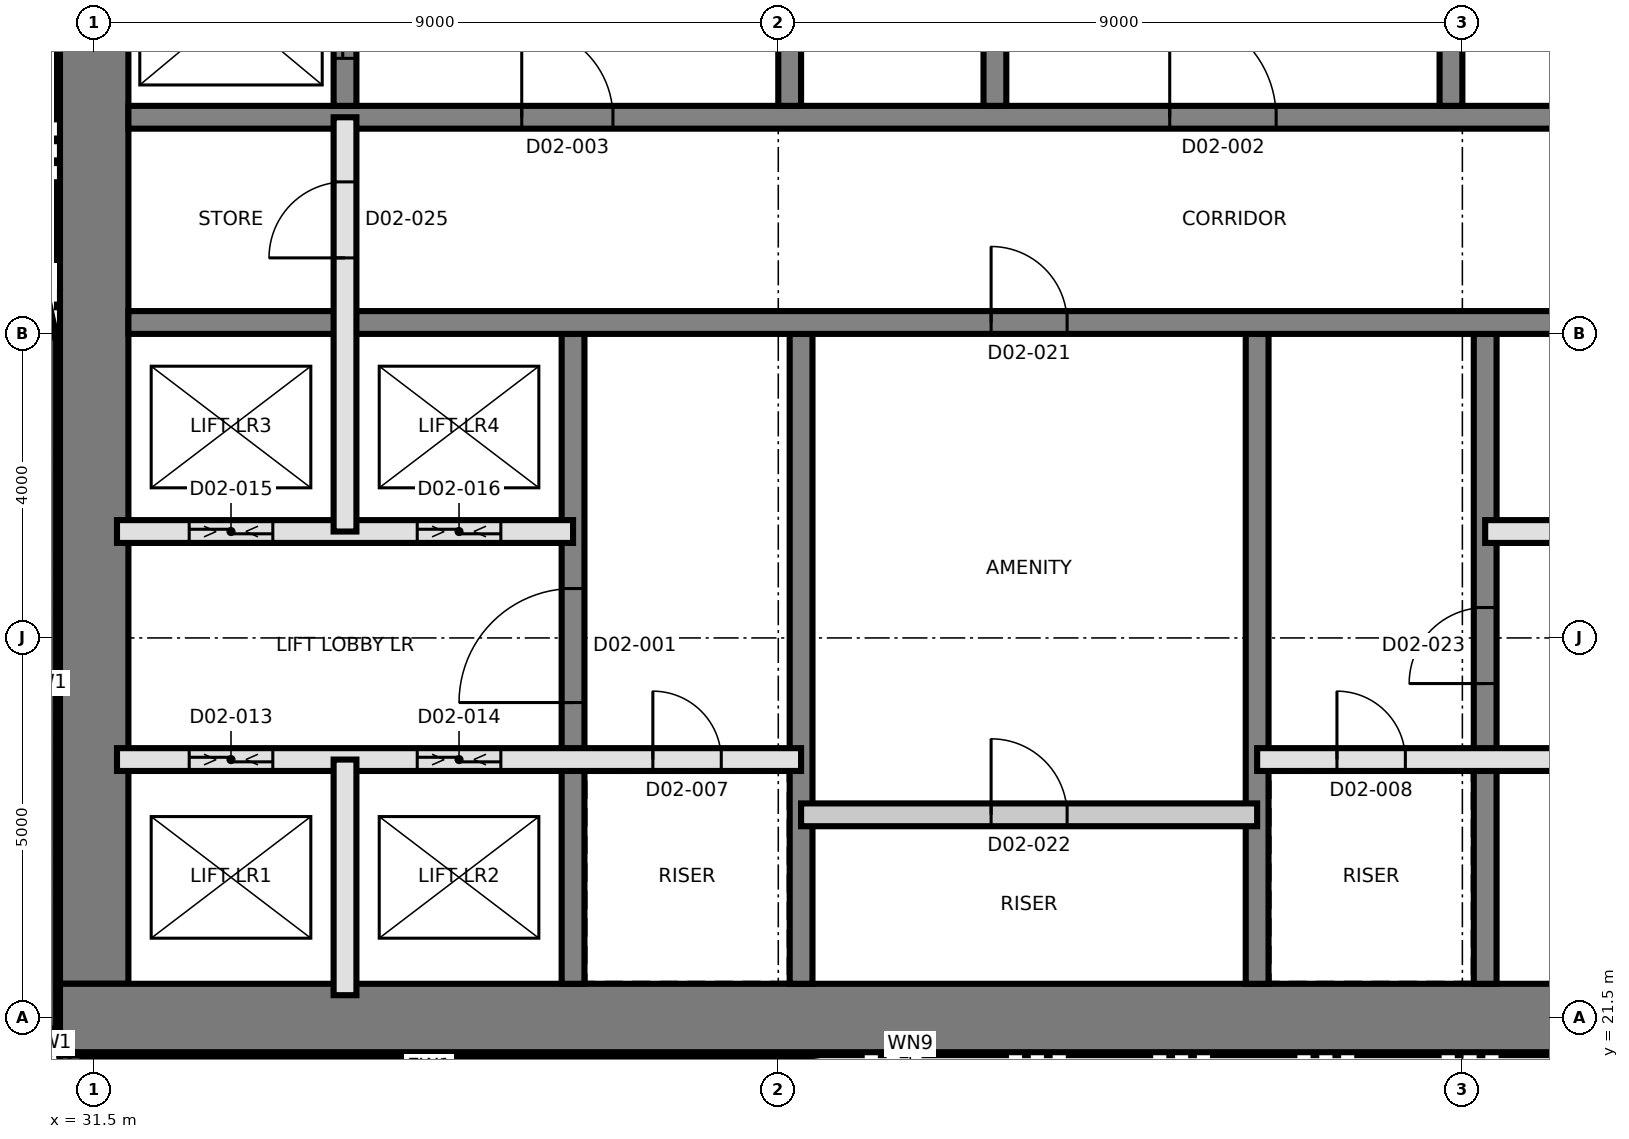
"""IFC4 building model, lengths in metres.
Left out: names, types, materials, properties, quantities, classifications, styles, units other than length and angle.
Written with IfcOpenShell. Run it as: python <this file> out.ifc"""

import sys

from ifc_helpers import new_model, si_unit, direction, frame, frame_2d, origin, place, context, subcontext, project, spatial, rectangle, extrude, element, fill, save


model = new_model("IFC4")
c1 = context("Model", 3, precision=1e-05, world=origin(), true_north=direction((0.0, 1.0)))
c2 = subcontext(c1, "Body", "Model", "MODEL_VIEW")
j1 = project(units=[si_unit("LENGTHUNIT", "METRE"), si_unit("PLANEANGLEUNIT", "RADIAN")], contexts=[c1])
p1 = place(None, origin())
s1 = spatial("IfcSite", under=j1, at=p1, CompositionType="ELEMENT")
p2 = place(p1, origin())
s2 = spatial("IfcBuilding", under=s1, at=p2, CompositionType="ELEMENT")
p3 = place(p2, frame((0.0, 0.0, 44.6)))
s3 = spatial("IfcBuildingStorey", under=s2, at=p3, CompositionType="ELEMENT", Elevation=44.6)
p4 = place(p3, frame((31.5, 21.95, 0.0), z_axis=(0.0, 0.0, 1.0), x_axis=(0.0, 1.0, 0.0)))
e1 = element("IfcWall", 1, at=p4, inside=s3, PredefinedType="SHEAR", context=c2, shape_type="SweptSolid", body=[
    extrude(rectangle(XDim=17.1, YDim=0.9, at=frame_2d((8.55, 0.0))), origin(), (0.0, 0.0, 1.0), 3.7),
])
p5 = place(p3, frame((31.05, 21.5, 0.0), z_axis=(0.0, 0.0, 1.0), x_axis=(1.0, 0.0, 0.0)))
e2 = element("IfcWall", 2, at=p5, inside=s3, PredefinedType="SHEAR", context=c2, shape_type="SweptSolid", body=[
    extrude(rectangle(XDim=27.0, YDim=0.9, at=frame_2d((13.5, 0.0))), origin(), (0.0, 0.0, 1.0), 3.7),
])
p6 = place(p3, frame((37.8, 21.95, 0.0), z_axis=(0.0, 0.0, 1.0), x_axis=(0.0, 1.0, 0.0)))
e3 = element("IfcWall", 3, at=p6, inside=s3, PredefinedType="SHEAR", context=c2, shape_type="SweptSolid", body=[
    extrude(rectangle(XDim=8.55, YDim=0.3, at=frame_2d((4.275, 0.0))), origin(), (0.0, 0.0, 1.0), 3.7),
])
p7 = place(p6, frame((3.7, 0.0, 0.0)))
e4 = element("IfcOpeningElement", 4, at=p7, cuts=e3, PredefinedType="OPENING", context=c2, shape_type="SweptSolid", body=[
    extrude(rectangle(XDim=1.5, YDim=2.1, at=frame_2d((0.75, 1.05))), frame((0.0, 0.16, 0.0), z_axis=(0.0, -1.0, 0.0), x_axis=(1.0, 0.0, 0.0)), (0.0, 0.0, 1.0), 0.32),
])
for number, where, z_axis, x_axis in (
    (5, (40.8, 21.95, 0.0), (0.0, 0.0, 1.0), (0.0, 1.0, 0.0)),
    (6, (46.8, 21.95, 0.0), (0.0, 0.0, 1.0), (0.0, 1.0, 0.0)),
):
    element("IfcWall", number, at=place(p3, frame(where, z_axis=z_axis, x_axis=x_axis)), inside=s3, PredefinedType="SHEAR", context=c2, shape_type="SweptSolid", body=[
        extrude(rectangle(XDim=8.55, YDim=0.3, at=frame_2d((4.275, 0.0))), origin(), (0.0, 0.0, 1.0), 3.7),
    ])
p8 = place(p3, frame((49.8, 21.95, 0.0), z_axis=(0.0, 0.0, 1.0), x_axis=(0.0, 1.0, 0.0)))
e7 = element("IfcWall", 7, at=p8, inside=s3, PredefinedType="SHEAR", context=c2, shape_type="SweptSolid", body=[
    extrude(rectangle(XDim=8.55, YDim=0.3, at=frame_2d((4.275, 0.0))), origin(), (0.0, 0.0, 1.0), 3.7),
])
p9 = place(p8, frame((3.95, 0.0, 0.0)))
e8 = element("IfcOpeningElement", 8, at=p9, cuts=e7, PredefinedType="OPENING", context=c2, shape_type="SweptSolid", body=[
    extrude(rectangle(XDim=1.0, YDim=2.1, at=frame_2d((0.5, 1.05))), frame((0.0, 0.16, 0.0), z_axis=(0.0, -1.0, 0.0), x_axis=(1.0, 0.0, 0.0)), (0.0, 0.0, 1.0), 0.32),
])
p10 = place(p3, frame((31.95, 30.65, 0.0), z_axis=(0.0, 0.0, 1.0), x_axis=(1.0, 0.0, 0.0)))
e9 = element("IfcWall", 9, at=p10, inside=s3, PredefinedType="SHEAR", context=c2, shape_type="SweptSolid", body=[
    extrude(rectangle(XDim=26.1, YDim=0.3, at=frame_2d((13.05, 0.0))), origin(), (0.0, 0.0, 1.0), 3.7),
])
p11 = place(p10, frame((24.55, 0.0, 0.0)))
e10 = element("IfcOpeningElement", 10, at=p11, cuts=e9, PredefinedType="OPENING", context=c2, shape_type="SweptSolid", body=[
    extrude(rectangle(XDim=1.0, YDim=2.1, at=frame_2d((0.5, 1.05))), frame((0.0, 0.16, 0.0), z_axis=(0.0, -1.0, 0.0), x_axis=(1.0, 0.0, 0.0)), (0.0, 0.0, 1.0), 0.32),
])
p12 = place(p10, frame((11.35, 0.0, 0.0)))
e11 = element("IfcOpeningElement", 11, at=p12, cuts=e9, PredefinedType="OPENING", context=c2, shape_type="SweptSolid", body=[
    extrude(rectangle(XDim=1.0, YDim=2.1, at=frame_2d((0.5, 1.05))), frame((0.0, 0.16, 0.0), z_axis=(0.0, -1.0, 0.0), x_axis=(1.0, 0.0, 0.0)), (0.0, 0.0, 1.0), 0.32),
])
p13 = place(p3, frame((31.95, 33.35, 0.0), z_axis=(0.0, 0.0, 1.0), x_axis=(1.0, 0.0, 0.0)))
e12 = element("IfcWall", 12, at=p13, inside=s3, PredefinedType="SHEAR", context=c2, shape_type="SweptSolid", body=[
    extrude(rectangle(XDim=26.1, YDim=0.3, at=frame_2d((13.05, 0.0))), origin(), (0.0, 0.0, 1.0), 3.7),
])
p14 = place(p13, frame((13.7, 0.0, 0.0)))
e13 = element("IfcOpeningElement", 13, at=p14, cuts=e12, PredefinedType="OPENING", context=c2, shape_type="SweptSolid", body=[
    extrude(rectangle(XDim=1.4, YDim=2.1, at=frame_2d((0.7, 1.05))), frame((0.0, 0.16, 0.0), z_axis=(0.0, -1.0, 0.0), x_axis=(1.0, 0.0, 0.0)), (0.0, 0.0, 1.0), 0.32),
])
p15 = place(p13, frame((5.175, 0.0, 0.0)))
e14 = element("IfcOpeningElement", 14, at=p15, cuts=e12, PredefinedType="OPENING", context=c2, shape_type="SweptSolid", body=[
    extrude(rectangle(XDim=1.2, YDim=2.1, at=frame_2d((0.6, 1.05))), frame((0.0, 0.16, 0.0), z_axis=(0.0, -1.0, 0.0), x_axis=(1.0, 0.0, 0.0)), (0.0, 0.0, 1.0), 0.32),
])
p16 = place(p13, frame((19.725, 0.0, 0.0)))
e15 = element("IfcOpeningElement", 15, at=p16, cuts=e12, PredefinedType="OPENING", context=c2, shape_type="SweptSolid", body=[
    extrude(rectangle(XDim=1.2, YDim=2.1, at=frame_2d((0.6, 1.05))), frame((0.0, 0.16, 0.0), z_axis=(0.0, -1.0, 0.0), x_axis=(1.0, 0.0, 0.0)), (0.0, 0.0, 1.0), 0.32),
])
for number, where, z_axis, x_axis in (
    (16, (40.65, 33.5, 0.0), (0.0, 0.0, 1.0), (0.0, 1.0, 0.0)),
    (17, (43.35, 33.5, 0.0), (0.0, 0.0, 1.0), (0.0, 1.0, 0.0)),
):
    element("IfcWall", number, at=place(p3, frame(where, z_axis=z_axis, x_axis=x_axis)), inside=s3, PredefinedType="SHEAR", context=c2, shape_type="SweptSolid", body=[
        extrude(rectangle(XDim=5.55, YDim=0.3, at=frame_2d((2.775, 0.0))), origin(), (0.0, 0.0, 1.0), 3.7),
    ])
p17 = place(p3, frame((34.8, 33.5, 0.0), z_axis=(0.0, 0.0, 1.0), x_axis=(0.0, 1.0, 0.0)))
e18 = element("IfcWall", 18, at=p17, inside=s3, PredefinedType="SHEAR", context=c2, shape_type="SweptSolid", body=[
    extrude(rectangle(XDim=2.55, YDim=0.3, at=frame_2d((1.275, 0.0))), origin(), (0.0, 0.0, 1.0), 3.7),
])
p18 = place(p17, frame((0.625, 0.0, 0.0)))
e19 = element("IfcOpeningElement", 19, at=p18, cuts=e18, PredefinedType="OPENING", context=c2, shape_type="SweptSolid", body=[
    extrude(rectangle(XDim=1.3, YDim=2.4, at=frame_2d((0.65, 1.2))), frame((0.0, 0.16, 0.0), z_axis=(0.0, -1.0, 0.0), x_axis=(1.0, 0.0, 0.0)), (0.0, 0.0, 1.0), 0.32),
])
p19 = place(p3, frame((49.35, 33.5, 0.0), z_axis=(0.0, 0.0, 1.0), x_axis=(0.0, 1.0, 0.0)))
e20 = element("IfcWall", 20, at=p19, inside=s3, PredefinedType="SHEAR", context=c2, shape_type="SweptSolid", body=[
    extrude(rectangle(XDim=5.55, YDim=0.3, at=frame_2d((2.775, 0.0))), origin(), (0.0, 0.0, 1.0), 3.7),
])
p20 = place(p3, frame((30.85, 30.454, 0.0), z_axis=(0.0, 0.0, 1.0), x_axis=(0.0, -1.0, 0.0)))
e21 = element("IfcWall", 21, at=p20, inside=s3, PredefinedType="SOLIDWALL", context=c2, shape_type="SweptSolid", body=[
    extrude(rectangle(XDim=9.094, YDim=0.3, at=frame_2d((4.547, 0.0))), origin(), (0.0, 0.0, 1.0), 3.4),
])
for number, where, z_axis, x_axis in (
    (22, (30.861, 21.302, 0.0), (0.0, 0.0, 1.0), (0.383, -0.924, 0.0)),
    (23, (31.048, 20.967, 0.0), (0.0, 0.0, 1.0), (0.924, -0.383, 0.0)),
):
    element("IfcWall", number, at=place(p3, frame(where, z_axis=z_axis, x_axis=x_axis)), inside=s3, PredefinedType="SOLIDWALL", context=c2, shape_type="SweptSolid", body=[
        extrude(rectangle(XDim=0.275, YDim=0.3, at=frame_2d((0.138, 0.0))), origin(), (0.0, 0.0, 1.0), 3.4),
    ])
p21 = place(p3, frame((31.36, 20.85, 0.0), z_axis=(0.0, 0.0, 1.0), x_axis=(1.0, 0.0, 0.0)))
e24 = element("IfcWall", 24, at=p21, inside=s3, PredefinedType="SOLIDWALL", context=c2, shape_type="SweptSolid", body=[
    extrude(rectangle(XDim=9.094, YDim=0.3, at=frame_2d((4.547, 0.0))), origin(), (0.0, 0.0, 1.0), 3.4),
])
p22 = place(p3, frame((40.474, 20.849, 0.0), z_axis=(0.0, 0.0, 1.0), x_axis=(0.990778329255, -0.135492812649, 0.0)))
e25 = element("IfcWall", 25, at=p22, inside=s3, PredefinedType="SOLIDWALL", context=c2, shape_type="SweptSolid", body=[
    extrude(rectangle(XDim=3.559, YDim=0.3, at=frame_2d((1.779, 0.0))), origin(), (0.0, 0.0, 1.0), 3.4),
])
p23 = place(p22, frame((1.179, 0.0, 0.9)))
e26 = element("IfcOpeningElement", 26, at=p23, cuts=e25, PredefinedType="OPENING", context=c2, shape_type="SweptSolid", body=[
    extrude(rectangle(XDim=1.2, YDim=1.5, at=frame_2d((0.6, 0.75))), frame((0.0, 0.16, 0.0), z_axis=(0.0, -1.0, 0.0), x_axis=(1.0, 0.0, 0.0)), (0.0, 0.0, 1.0), 0.32),
])
p24 = place(p3, frame((30.506, 32.049, 0.0), z_axis=(0.0, 0.0, 1.0), x_axis=(0.212695686462, -0.977118490747, 0.0)))
e27 = element("IfcWall", 27, at=p24, inside=s3, PredefinedType="SOLIDWALL", context=c2, shape_type="SweptSolid", body=[
    extrude(rectangle(XDim=1.6, YDim=0.3, at=frame_2d((0.8, 0.0))), origin(), (0.0, 0.0, 1.0), 3.4),
])
p25 = place(p3, frame((40.8, 24.173, 0.0), z_axis=(0.0, 0.0, 1.0), x_axis=(1.0, 0.0, 0.0)))
e28 = element("IfcWall", 28, at=p25, inside=s3, PredefinedType="PARTITIONING", context=c2, shape_type="SweptSolid", body=[
    extrude(rectangle(XDim=6.0, YDim=0.3, at=frame_2d((3.0, 0.0))), origin(), (0.0, 0.0, 1.0), 3.4),
])
p26 = place(p25, frame((2.5, 0.0, 0.0)))
e29 = element("IfcOpeningElement", 29, at=p26, cuts=e28, PredefinedType="OPENING", context=c2, shape_type="SweptSolid", body=[
    extrude(rectangle(XDim=1.0, YDim=2.1, at=frame_2d((0.5, 1.05))), frame((0.0, 0.16, 0.0), z_axis=(0.0, -1.0, 0.0), x_axis=(1.0, 0.0, 0.0)), (0.0, 0.0, 1.0), 0.32),
])
p27 = place(p3, frame((31.8, 24.9, 0.0), z_axis=(0.0, 0.0, 1.0), x_axis=(1.0, 0.0, 0.0)))
e30 = element("IfcWall", 30, at=p27, inside=s3, PredefinedType="SOLIDWALL", context=c2, shape_type="SweptSolid", body=[
    extrude(rectangle(XDim=9.0, YDim=0.3, at=frame_2d((4.5, 0.0))), origin(), (0.0, 0.0, 1.0), 3.4),
])
p28 = place(p27, frame((7.05, 0.0, 0.0)))
e31 = element("IfcOpeningElement", 31, at=p28, cuts=e30, PredefinedType="OPENING", context=c2, shape_type="SweptSolid", body=[
    extrude(rectangle(XDim=0.9, YDim=2.1, at=frame_2d((0.45, 1.05))), frame((0.0, 0.16, 0.0), z_axis=(0.0, -1.0, 0.0), x_axis=(1.0, 0.0, 0.0)), (0.0, 0.0, 1.0), 0.32),
])
p29 = place(p27, frame((0.95, 0.0, 0.0)))
e32 = element("IfcOpeningElement", 32, at=p29, cuts=e30, PredefinedType="OPENING", context=c2, shape_type="SweptSolid", body=[
    extrude(rectangle(XDim=1.1, YDim=2.4, at=frame_2d((0.55, 1.2))), frame((0.0, 0.16, 0.0), z_axis=(0.0, -1.0, 0.0), x_axis=(1.0, 0.0, 0.0)), (0.0, 0.0, 1.0), 0.32),
])
p30 = place(p27, frame((3.95, 0.0, 0.0)))
e33 = element("IfcOpeningElement", 33, at=p30, cuts=e30, PredefinedType="OPENING", context=c2, shape_type="SweptSolid", body=[
    extrude(rectangle(XDim=1.1, YDim=2.4, at=frame_2d((0.55, 1.2))), frame((0.0, 0.16, 0.0), z_axis=(0.0, -1.0, 0.0), x_axis=(1.0, 0.0, 0.0)), (0.0, 0.0, 1.0), 0.32),
])
p31 = place(p3, frame((46.8, 24.9, 0.0), z_axis=(0.0, 0.0, 1.0), x_axis=(1.0, 0.0, 0.0)))
e34 = element("IfcWall", 34, at=p31, inside=s3, PredefinedType="SOLIDWALL", context=c2, shape_type="SweptSolid", body=[
    extrude(rectangle(XDim=9.0, YDim=0.3, at=frame_2d((4.5, 0.0))), origin(), (0.0, 0.0, 1.0), 3.4),
])
p32 = place(p31, frame((1.05, 0.0, 0.0)))
e35 = element("IfcOpeningElement", 35, at=p32, cuts=e34, PredefinedType="OPENING", context=c2, shape_type="SweptSolid", body=[
    extrude(rectangle(XDim=0.9, YDim=2.1, at=frame_2d((0.45, 1.05))), frame((0.0, 0.16, 0.0), z_axis=(0.0, -1.0, 0.0), x_axis=(1.0, 0.0, 0.0)), (0.0, 0.0, 1.0), 0.32),
])
p33 = place(p3, frame((31.8, 27.9, 0.0), z_axis=(0.0, 0.0, 1.0), x_axis=(1.0, 0.0, 0.0)))
e36 = element("IfcWall", 36, at=p33, inside=s3, PredefinedType="SOLIDWALL", context=c2, shape_type="SweptSolid", body=[
    extrude(rectangle(XDim=6.0, YDim=0.3, at=frame_2d((3.0, 0.0))), origin(), (0.0, 0.0, 1.0), 3.4),
])
p34 = place(p33, frame((0.95, 0.0, 0.0)))
e37 = element("IfcOpeningElement", 37, at=p34, cuts=e36, PredefinedType="OPENING", context=c2, shape_type="SweptSolid", body=[
    extrude(rectangle(XDim=1.1, YDim=2.4, at=frame_2d((0.55, 1.2))), frame((0.0, 0.16, 0.0), z_axis=(0.0, -1.0, 0.0), x_axis=(1.0, 0.0, 0.0)), (0.0, 0.0, 1.0), 0.32),
])
p35 = place(p33, frame((3.95, 0.0, 0.0)))
e38 = element("IfcOpeningElement", 38, at=p35, cuts=e36, PredefinedType="OPENING", context=c2, shape_type="SweptSolid", body=[
    extrude(rectangle(XDim=1.1, YDim=2.4, at=frame_2d((0.55, 1.2))), frame((0.0, 0.16, 0.0), z_axis=(0.0, -1.0, 0.0), x_axis=(1.0, 0.0, 0.0)), (0.0, 0.0, 1.0), 0.32),
])
p36 = place(p3, frame((49.8, 27.9, 0.0), z_axis=(0.0, 0.0, 1.0), x_axis=(1.0, 0.0, 0.0)))
e39 = element("IfcWall", 39, at=p36, inside=s3, PredefinedType="SOLIDWALL", context=c2, shape_type="SweptSolid", body=[
    extrude(rectangle(XDim=6.0, YDim=0.3, at=frame_2d((3.0, 0.0))), origin(), (0.0, 0.0, 1.0), 3.4),
])
p37 = place(p3, frame((34.8, 21.8, 0.0), z_axis=(0.0, 0.0, 1.0), x_axis=(0.0, 1.0, 0.0)))
e40 = element("IfcWall", 40, at=p37, inside=s3, PredefinedType="SOLIDWALL", context=c2, shape_type="SweptSolid", body=[
    extrude(rectangle(XDim=3.1, YDim=0.3, at=frame_2d((1.55, 0.0))), origin(), (0.0, 0.0, 1.0), 3.4),
])
p38 = place(p3, frame((34.8, 27.9, 0.0), z_axis=(0.0, 0.0, 1.0), x_axis=(0.0, 1.0, 0.0)))
e41 = element("IfcWall", 41, at=p38, inside=s3, PredefinedType="SOLIDWALL", context=c2, shape_type="SweptSolid", body=[
    extrude(rectangle(XDim=5.45, YDim=0.3, at=frame_2d((2.725, 0.0))), origin(), (0.0, 0.0, 1.0), 3.4),
])
p39 = place(p38, frame((3.6, 0.0, 0.0)))
e42 = element("IfcOpeningElement", 42, at=p39, cuts=e41, PredefinedType="OPENING", context=c2, shape_type="SweptSolid", body=[
    extrude(rectangle(XDim=1.0, YDim=2.1, at=frame_2d((0.5, 1.05))), frame((0.0, 0.16, 0.0), z_axis=(0.0, -1.0, 0.0), x_axis=(1.0, 0.0, 0.0)), (0.0, 0.0, 1.0), 0.32),
])
p40 = place(p7, origin())
e43 = element("IfcDoor", 43, at=p40, inside=s3, OperationType="SINGLE_SWING_LEFT", PredefinedType="DOOR", context=c2, shape_type="SweptSolid", body=[
    extrude(rectangle(XDim=1.5, YDim=2.1, at=frame_2d((0.75, 1.05))), frame((0.0, 0.025, 0.0), z_axis=(0.0, -1.0, 0.0), x_axis=(1.0, 0.0, 0.0)), (0.0, 0.0, 1.0), 0.05),
])
fill(e4, e43)
p41 = place(p14, origin())
e44 = element("IfcDoor", 44, at=p41, inside=s3, OperationType="SINGLE_SWING_RIGHT", PredefinedType="DOOR", context=c2, shape_type="SweptSolid", body=[
    extrude(rectangle(XDim=1.4, YDim=2.1, at=frame_2d((0.7, 1.05))), frame((0.0, 0.025, 0.0), z_axis=(0.0, -1.0, 0.0), x_axis=(1.0, 0.0, 0.0)), (0.0, 0.0, 1.0), 0.05),
])
fill(e13, e44)
p42 = place(p15, origin())
e45 = element("IfcDoor", 45, at=p42, inside=s3, OperationType="SINGLE_SWING_LEFT", PredefinedType="DOOR", context=c2, shape_type="SweptSolid", body=[
    extrude(rectangle(XDim=1.2, YDim=2.1, at=frame_2d((0.6, 1.05))), frame((0.0, 0.025, 0.0), z_axis=(0.0, -1.0, 0.0), x_axis=(1.0, 0.0, 0.0)), (0.0, 0.0, 1.0), 0.05),
])
fill(e14, e45)
p43 = place(p28, origin())
e46 = element("IfcDoor", 46, at=p43, inside=s3, OperationType="SINGLE_SWING_LEFT", PredefinedType="DOOR", context=c2, shape_type="SweptSolid", body=[
    extrude(rectangle(XDim=0.9, YDim=2.1, at=frame_2d((0.45, 1.05))), frame((0.0, 0.025, 0.0), z_axis=(0.0, -1.0, 0.0), x_axis=(1.0, 0.0, 0.0)), (0.0, 0.0, 1.0), 0.05),
])
fill(e31, e46)
p44 = place(p32, origin())
e47 = element("IfcDoor", 47, at=p44, inside=s3, OperationType="SINGLE_SWING_RIGHT", PredefinedType="DOOR", context=c2, shape_type="SweptSolid", body=[
    extrude(rectangle(XDim=0.9, YDim=2.1, at=frame_2d((0.45, 1.05))), frame((0.0, 0.025, 0.0), z_axis=(0.0, -1.0, 0.0), x_axis=(1.0, 0.0, 0.0)), (0.0, 0.0, 1.0), 0.05),
])
fill(e35, e47)
p45 = place(p29, origin())
e48 = element("IfcDoor", 48, at=p45, inside=s3, OperationType="SLIDING_TO_LEFT", PredefinedType="DOOR", context=c2, shape_type="SweptSolid", body=[
    extrude(rectangle(XDim=1.1, YDim=2.4, at=frame_2d((0.55, 1.2))), frame((0.0, 0.025, 0.0), z_axis=(0.0, -1.0, 0.0), x_axis=(1.0, 0.0, 0.0)), (0.0, 0.0, 1.0), 0.05),
])
fill(e32, e48)
p46 = place(p30, origin())
e49 = element("IfcDoor", 49, at=p46, inside=s3, OperationType="SLIDING_TO_LEFT", PredefinedType="DOOR", context=c2, shape_type="SweptSolid", body=[
    extrude(rectangle(XDim=1.1, YDim=2.4, at=frame_2d((0.55, 1.2))), frame((0.0, 0.025, 0.0), z_axis=(0.0, -1.0, 0.0), x_axis=(1.0, 0.0, 0.0)), (0.0, 0.0, 1.0), 0.05),
])
fill(e33, e49)
p47 = place(p34, origin())
e50 = element("IfcDoor", 50, at=p47, inside=s3, OperationType="SLIDING_TO_LEFT", PredefinedType="DOOR", context=c2, shape_type="SweptSolid", body=[
    extrude(rectangle(XDim=1.1, YDim=2.4, at=frame_2d((0.55, 1.2))), frame((0.0, 0.025, 0.0), z_axis=(0.0, -1.0, 0.0), x_axis=(1.0, 0.0, 0.0)), (0.0, 0.0, 1.0), 0.05),
])
fill(e37, e50)
p48 = place(p35, origin())
e51 = element("IfcDoor", 51, at=p48, inside=s3, OperationType="SLIDING_TO_LEFT", PredefinedType="DOOR", context=c2, shape_type="SweptSolid", body=[
    extrude(rectangle(XDim=1.1, YDim=2.4, at=frame_2d((0.55, 1.2))), frame((0.0, 0.025, 0.0), z_axis=(0.0, -1.0, 0.0), x_axis=(1.0, 0.0, 0.0)), (0.0, 0.0, 1.0), 0.05),
])
fill(e38, e51)
p49 = place(p18, origin())
e52 = element("IfcDoor", 52, at=p49, inside=s3, OperationType="SLIDING_TO_LEFT", PredefinedType="DOOR", context=c2, shape_type="SweptSolid", body=[
    extrude(rectangle(XDim=1.3, YDim=2.4, at=frame_2d((0.65, 1.2))), frame((0.0, 0.025, 0.0), z_axis=(0.0, -1.0, 0.0), x_axis=(1.0, 0.0, 0.0)), (0.0, 0.0, 1.0), 0.05),
])
fill(e19, e52)
p50 = place(p12, origin())
e53 = element("IfcDoor", 53, at=p50, inside=s3, OperationType="SINGLE_SWING_LEFT", PredefinedType="DOOR", context=c2, shape_type="SweptSolid", body=[
    extrude(rectangle(XDim=1.0, YDim=2.1, at=frame_2d((0.5, 1.05))), frame((0.0, 0.025, 0.0), z_axis=(0.0, -1.0, 0.0), x_axis=(1.0, 0.0, 0.0)), (0.0, 0.0, 1.0), 0.05),
])
fill(e11, e53)
p51 = place(p26, origin())
e54 = element("IfcDoor", 54, at=p51, inside=s3, OperationType="SINGLE_SWING_RIGHT", PredefinedType="DOOR", context=c2, shape_type="SweptSolid", body=[
    extrude(rectangle(XDim=1.0, YDim=2.1, at=frame_2d((0.5, 1.05))), frame((0.0, 0.025, 0.0), z_axis=(0.0, -1.0, 0.0), x_axis=(1.0, 0.0, 0.0)), (0.0, 0.0, 1.0), 0.05),
])
fill(e29, e54)
p52 = place(p9, origin())
e55 = element("IfcDoor", 55, at=p52, inside=s3, OperationType="SINGLE_SWING_LEFT", PredefinedType="DOOR", context=c2, shape_type="SweptSolid", body=[
    extrude(rectangle(XDim=1.0, YDim=2.1, at=frame_2d((0.5, 1.05))), frame((0.0, 0.025, 0.0), z_axis=(0.0, -1.0, 0.0), x_axis=(1.0, 0.0, 0.0)), (0.0, 0.0, 1.0), 0.05),
])
fill(e8, e55)
p53 = place(p39, origin())
e56 = element("IfcDoor", 56, at=p53, inside=s3, OperationType="SINGLE_SWING_LEFT", PredefinedType="DOOR", context=c2, shape_type="SweptSolid", body=[
    extrude(rectangle(XDim=1.0, YDim=2.1, at=frame_2d((0.5, 1.05))), frame((0.0, 0.025, 0.0), z_axis=(0.0, -1.0, 0.0), x_axis=(1.0, 0.0, 0.0)), (0.0, 0.0, 1.0), 0.05),
])
fill(e42, e56)
save(model, sys.argv[1])
